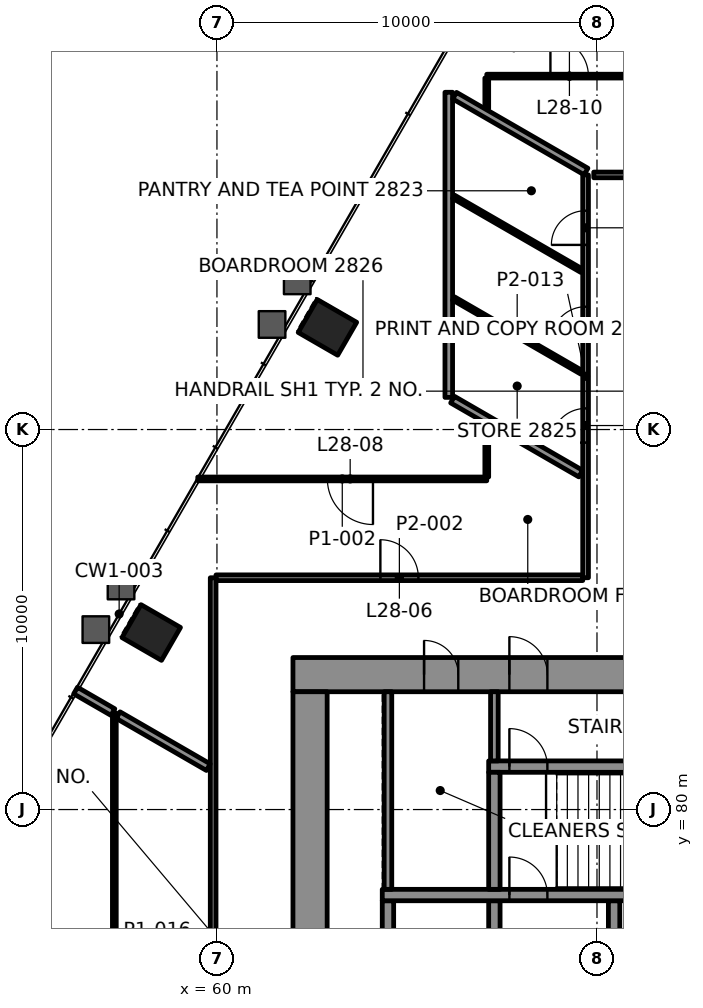
"""IFC4 building model, lengths in metres.
Left out: names, types, materials, properties, quantities, classifications, styles, units other than length and angle.
Written with IfcOpenShell. Run it as: python <this file> out.ifc"""

import sys

from ifc_helpers import new_model, si_unit, direction, frame, frame_2d, origin, origin_2d, place, context, subcontext, project, spatial, rectangle, extrude, element, fill, save


model = new_model("IFC4")
c1 = context("Model", 3, precision=1e-05, world=origin(), true_north=direction((0.0, 1.0)))
c2 = subcontext(c1, "Body", "Model", "MODEL_VIEW")
j1 = project(units=[si_unit("LENGTHUNIT", "METRE"), si_unit("PLANEANGLEUNIT", "RADIAN")], contexts=[c1])
p1 = place(None, origin())
s1 = spatial("IfcSite", under=j1, at=p1, CompositionType="ELEMENT")
p2 = place(p1, origin())
s2 = spatial("IfcBuilding", under=s1, at=p2, CompositionType="ELEMENT")
p3 = place(p2, frame((0.0, 0.0, 124.0)))
s3 = spatial("IfcBuildingStorey", under=s2, at=p3, CompositionType="ELEMENT", Elevation=124.0)
for number, where, z_axis, x_axis in (
    (1, (62.907, 92.688, -0.0), (0.0, 0.0, 1.0), (-0.5, -0.866, 0.0)),
    (2, (58.271, 84.658, -0.0), (0.0, 0.0, 1.0), (-0.5, -0.866, 0.0)),
):
    element("IfcColumn", number, at=place(p3, frame(where, z_axis=z_axis, x_axis=x_axis)), inside=s3, PredefinedType="COLUMN", context=c2, shape_type="SweptSolid", body=[
        extrude(rectangle(XDim=1.0, YDim=1.2, at=origin_2d()), origin(), (0.0, 0.0, 1.0), 4.2),
    ])
p4 = place(p3, frame((62.0, 83.55, 0.0), z_axis=(0.0, 0.0, 1.0), x_axis=(1.0, 0.0, 0.0)))
e3 = element("IfcWall", 3, at=p4, inside=s3, PredefinedType="SHEAR", context=c2, shape_type="SweptSolid", body=[
    extrude(rectangle(XDim=26.0, YDim=0.9, at=frame_2d((13.0, 0.0))), origin(), (0.0, 0.0, 1.0), 4.0),
])
p5 = place(p4, frame((5.695, 0.0, 0.0)))
e4 = element("IfcOpeningElement", 4, at=p5, cuts=e3, PredefinedType="OPENING", context=c2, shape_type="SweptSolid", body=[
    extrude(rectangle(XDim=1.0, YDim=2.1, at=frame_2d((0.5, 1.05))), frame((0.0, 0.46, 0.0), z_axis=(0.0, -1.0, 0.0), x_axis=(1.0, 0.0, 0.0)), (0.0, 0.0, 1.0), 0.92),
])
p6 = place(p4, frame((19.505, 0.0, 0.0)))
e5 = element("IfcOpeningElement", 5, at=p6, cuts=e3, PredefinedType="OPENING", context=c2, shape_type="SweptSolid", body=[
    extrude(rectangle(XDim=1.0, YDim=2.1, at=frame_2d((0.5, 1.05))), frame((0.0, 0.46, 0.0), z_axis=(0.0, -1.0, 0.0), x_axis=(1.0, 0.0, 0.0)), (0.0, 0.0, 1.0), 0.92),
])
p7 = place(p4, frame((3.45, 0.0, 0.0)))
e6 = element("IfcOpeningElement", 6, at=p7, cuts=e3, PredefinedType="OPENING", context=c2, shape_type="SweptSolid", body=[
    extrude(rectangle(XDim=0.9, YDim=2.1, at=frame_2d((0.45, 1.05))), frame((0.0, 0.46, 0.0), z_axis=(0.0, -1.0, 0.0), x_axis=(1.0, 0.0, 0.0)), (0.0, 0.0, 1.0), 0.92),
])
p8 = place(p4, frame((12.65, 0.0, 0.0)))
e7 = element("IfcOpeningElement", 7, at=p8, cuts=e3, PredefinedType="OPENING", context=c2, shape_type="SweptSolid", body=[
    extrude(rectangle(XDim=0.9, YDim=2.1, at=frame_2d((0.45, 1.05))), frame((0.0, 0.46, 0.0), z_axis=(0.0, -1.0, 0.0), x_axis=(1.0, 0.0, 0.0)), (0.0, 0.0, 1.0), 0.92),
])
p9 = place(p4, frame((22.55, 0.0, 0.0)))
e8 = element("IfcOpeningElement", 8, at=p9, cuts=e3, PredefinedType="OPENING", context=c2, shape_type="SweptSolid", body=[
    extrude(rectangle(XDim=0.9, YDim=2.1, at=frame_2d((0.45, 1.05))), frame((0.0, 0.46, 0.0), z_axis=(0.0, -1.0, 0.0), x_axis=(1.0, 0.0, 0.0)), (0.0, 0.0, 1.0), 0.92),
])
p10 = place(p3, frame((62.45, 66.9, 0.0), z_axis=(0.0, 0.0, 1.0), x_axis=(0.0, 1.0, 0.0)))
e9 = element("IfcWall", 9, at=p10, inside=s3, PredefinedType="SHEAR", context=c2, shape_type="SweptSolid", body=[
    extrude(rectangle(XDim=16.2, YDim=0.9, at=frame_2d((8.1, 0.0))), origin(), (0.0, 0.0, 1.0), 4.0),
])
p11 = place(p10, frame((5.5, 0.0, 0.0)))
e10 = element("IfcOpeningElement", 10, at=p11, cuts=e9, PredefinedType="OPENING", context=c2, shape_type="SweptSolid", body=[
    extrude(rectangle(XDim=1.8, YDim=2.1, at=frame_2d((0.9, 1.05))), frame((0.0, 0.46, 0.0), z_axis=(0.0, -1.0, 0.0), x_axis=(1.0, 0.0, 0.0)), (0.0, 0.0, 1.0), 0.92),
])
for number, where, z_axis, x_axis in (
    (11, (64.5, 75.0, 0.0), (0.0, 0.0, 1.0), (0.0, 1.0, 0.0)),
    (12, (67.3, 75.0, 0.0), (0.0, 0.0, 1.0), (0.0, 1.0, 0.0)),
):
    element("IfcWall", number, at=place(p3, frame(where, z_axis=z_axis, x_axis=x_axis)), inside=s3, PredefinedType="SHEAR", context=c2, shape_type="SweptSolid", body=[
        extrude(rectangle(XDim=2.6, YDim=0.3, at=frame_2d((1.3, 0.0))), origin(), (0.0, 0.0, 1.0), 4.0),
    ])
p12 = place(p3, frame((70.45, 75.0, 0.0), z_axis=(0.0, 0.0, 1.0), x_axis=(0.0, 1.0, 0.0)))
e13 = element("IfcWall", 13, at=p12, inside=s3, PredefinedType="SHEAR", context=c2, shape_type="SweptSolid", body=[
    extrude(rectangle(XDim=2.6, YDim=0.3, at=frame_2d((1.3, 0.0))), origin(), (0.0, 0.0, 1.0), 4.0),
])
p13 = place(p12, frame((0.15, 0.0, 0.0)))
e14 = element("IfcOpeningElement", 14, at=p13, cuts=e13, PredefinedType="OPENING", context=c2, shape_type="SweptSolid", body=[
    extrude(rectangle(XDim=1.1, YDim=2.1, at=frame_2d((0.55, 1.05))), frame((0.0, 0.16, 0.0), z_axis=(0.0, -1.0, 0.0), x_axis=(1.0, 0.0, 0.0)), (0.0, 0.0, 1.0), 0.32),
])
p14 = place(p3, frame((64.35, 77.75, 0.0), z_axis=(0.0, 0.0, 1.0), x_axis=(1.0, 0.0, 0.0)))
e15 = element("IfcWall", 15, at=p14, inside=s3, PredefinedType="SHEAR", context=c2, shape_type="SweptSolid", body=[
    extrude(rectangle(XDim=22.75, YDim=0.3, at=frame_2d((11.375, 0.0))), origin(), (0.0, 0.0, 1.0), 4.0),
])
p15 = place(p14, frame((3.345, 0.0, 0.0)))
e16 = element("IfcOpeningElement", 16, at=p15, cuts=e15, PredefinedType="OPENING", context=c2, shape_type="SweptSolid", body=[
    extrude(rectangle(XDim=1.0, YDim=2.1, at=frame_2d((0.5, 1.05))), frame((0.0, 0.16, 0.0), z_axis=(0.0, -1.0, 0.0), x_axis=(1.0, 0.0, 0.0)), (0.0, 0.0, 1.0), 0.32),
])
p16 = place(p3, frame((67.15, 81.13, 0.0), z_axis=(0.0, 0.0, 1.0), x_axis=(1.0, 0.0, 0.0)))
e17 = element("IfcWall", 17, at=p16, inside=s3, PredefinedType="SHEAR", context=c2, shape_type="SweptSolid", body=[
    extrude(rectangle(XDim=6.91, YDim=0.3, at=frame_2d((3.455, 0.0))), origin(), (0.0, 0.0, 1.0), 4.0),
])
p17 = place(p16, frame((0.545, 0.0, 0.0)))
e18 = element("IfcOpeningElement", 18, at=p17, cuts=e17, PredefinedType="OPENING", context=c2, shape_type="SweptSolid", body=[
    extrude(rectangle(XDim=1.0, YDim=2.1, at=frame_2d((0.5, 1.05))), frame((0.0, 0.16, 0.0), z_axis=(0.0, -1.0, 0.0), x_axis=(1.0, 0.0, 0.0)), (0.0, 0.0, 1.0), 0.32),
])
p18 = place(p3, frame((67.3, 77.9, 0.0), z_axis=(0.0, 0.0, 1.0), x_axis=(0.0, 1.0, 0.0)))
e19 = element("IfcWall", 19, at=p18, inside=s3, PredefinedType="SHEAR", context=c2, shape_type="SweptSolid", body=[
    extrude(rectangle(XDim=3.08, YDim=0.3, at=frame_2d((1.54, 0.0))), origin(), (0.0, 0.0, 1.0), 4.0),
])
p19 = place(p3, frame((59.976, 86.1, 0.0), z_axis=(0.0, 0.0, 1.0), x_axis=(1.0, 0.0, 0.0)))
e20 = element("IfcWall", 20, at=p19, inside=s3, PredefinedType="PARTITIONING", context=c2, shape_type="SweptSolid", body=[
    extrude(rectangle(XDim=9.649, YDim=0.15, at=frame_2d((4.825, 0.0))), origin(), (0.0, 0.0, 1.0), 3.4),
])
p20 = place(p19, frame((4.325, 0.0, 0.0)))
e21 = element("IfcOpeningElement", 21, at=p20, cuts=e20, PredefinedType="OPENING", context=c2, shape_type="SweptSolid", body=[
    extrude(rectangle(XDim=1.0, YDim=2.1, at=frame_2d((0.5, 1.05))), frame((0.0, 0.085, 0.0), z_axis=(0.0, -1.0, 0.0), x_axis=(1.0, 0.0, 0.0)), (0.0, 0.0, 1.0), 0.17),
])
p21 = place(p3, frame((67.1, 88.7, 0.0), z_axis=(0.0, 0.0, 1.0), x_axis=(-1.0, 0.0, 0.0)))
e22 = element("IfcWall", 22, at=p21, inside=s3, PredefinedType="PARTITIONING", context=c2, shape_type="SweptSolid", body=[
    extrude(rectangle(XDim=7.604, YDim=0.1, at=frame_2d((3.802, 0.0))), origin(), (0.0, 0.0, 1.0), 3.165),
])
p22 = place(p21, frame((2.994, 0.0, 0.0)))
e23 = element("IfcOpeningElement", 23, at=p22, cuts=e22, PredefinedType="OPENING", context=c2, shape_type="SweptSolid", body=[
    extrude(rectangle(XDim=1.2, YDim=2.1, at=frame_2d((0.6, 1.05))), frame((0.0, 0.06, 0.0), z_axis=(0.0, -1.0, 0.0), x_axis=(1.0, 0.0, 0.0)), (0.0, 0.0, 1.0), 0.12),
])
p23 = place(p3, frame((69.915, 96.7, 0.0), z_axis=(0.0, 0.0, 1.0), x_axis=(1.0, 0.0, 0.0)))
e24 = element("IfcWall", 24, at=p23, inside=s3, PredefinedType="PARTITIONING", context=c2, shape_type="SweptSolid", body=[
    extrude(rectangle(XDim=4.11, YDim=0.15, at=frame_2d((2.055, 0.0))), origin(), (0.0, 0.0, 1.0), 3.4),
])
p24 = place(p23, frame((1.555, 0.0, 0.0)))
e25 = element("IfcOpeningElement", 25, at=p24, cuts=e24, PredefinedType="OPENING", context=c2, shape_type="SweptSolid", body=[
    extrude(rectangle(XDim=1.0, YDim=2.1, at=frame_2d((0.5, 1.05))), frame((0.0, 0.085, 0.0), z_axis=(0.0, -1.0, 0.0), x_axis=(1.0, 0.0, 0.0)), (0.0, 0.0, 1.0), 0.17),
])
p25 = place(p3, frame((67.1, 99.3, 0.0), z_axis=(0.0, 0.0, 1.0), x_axis=(1.0, 0.0, 0.0)))
e26 = element("IfcWall", 26, at=p25, inside=s3, PredefinedType="PARTITIONING", context=c2, shape_type="SweptSolid", body=[
    extrude(rectangle(XDim=4.349, YDim=0.1, at=frame_2d((2.175, 0.0))), origin(), (0.0, 0.0, 1.0), 3.4),
])
p26 = place(p25, frame((1.675, 0.0, 0.0)))
e27 = element("IfcOpeningElement", 27, at=p26, cuts=e26, PredefinedType="OPENING", context=c2, shape_type="SweptSolid", body=[
    extrude(rectangle(XDim=1.0, YDim=2.1, at=frame_2d((0.5, 1.05))), frame((0.0, 0.06, 0.0), z_axis=(0.0, -1.0, 0.0), x_axis=(1.0, 0.0, 0.0)), (0.0, 0.0, 1.0), 0.12),
])
p27 = place(p3, frame((69.7, 86.1, 0.0), z_axis=(0.0, 0.0, 1.0), x_axis=(0.0, 1.0, 0.0)))
e28 = element("IfcWall", 28, at=p27, inside=s3, PredefinedType="PARTITIONING", context=c2, shape_type="SweptSolid", body=[
    extrude(rectangle(XDim=10.6, YDim=0.15, at=frame_2d((5.3, 0.0))), origin(), (0.0, 0.0, 1.0), 3.322),
])
p28 = place(p27, frame((3.555, 0.0, 0.0)))
e29 = element("IfcOpeningElement", 29, at=p28, cuts=e28, PredefinedType="OPENING", context=c2, shape_type="SweptSolid", body=[
    extrude(rectangle(XDim=0.9, YDim=2.1, at=frame_2d((0.45, 1.05))), frame((0.0, 0.085, 0.0), z_axis=(0.0, -1.0, 0.0), x_axis=(1.0, 0.0, 0.0)), (0.0, 0.0, 1.0), 0.17),
])
p29 = place(p27, frame((6.232, 0.0, 0.0)))
e30 = element("IfcOpeningElement", 30, at=p29, cuts=e28, PredefinedType="OPENING", context=c2, shape_type="SweptSolid", body=[
    extrude(rectangle(XDim=0.9, YDim=2.1, at=frame_2d((0.45, 1.05))), frame((0.0, 0.085, 0.0), z_axis=(0.0, -1.0, 0.0), x_axis=(1.0, 0.0, 0.0)), (0.0, 0.0, 1.0), 0.17),
])
p30 = place(p27, frame((8.759, 0.0, 0.0)))
e31 = element("IfcOpeningElement", 31, at=p30, cuts=e28, PredefinedType="OPENING", context=c2, shape_type="SweptSolid", body=[
    extrude(rectangle(XDim=0.9, YDim=2.1, at=frame_2d((0.45, 1.05))), frame((0.0, 0.085, 0.0), z_axis=(0.0, -1.0, 0.0), x_axis=(1.0, 0.0, 0.0)), (0.0, 0.0, 1.0), 0.17),
])
p31 = place(p3, frame((67.1, 88.75, 0.0), z_axis=(0.0, 0.0, 1.0), x_axis=(0.0, 1.0, 0.0)))
e32 = element("IfcWall", 32, at=p31, inside=s3, PredefinedType="PARTITIONING", context=c2, shape_type="SweptSolid", body=[
    extrude(rectangle(XDim=1.372, YDim=0.1, at=frame_2d((0.686, 0.0))), origin(), (0.0, 0.0, 1.0), 3.322),
])
p32 = place(p3, frame((67.1, 98.443, 0.0), z_axis=(0.0, 0.0, 1.0), x_axis=(0.0, 1.0, 0.0)))
e33 = element("IfcWall", 33, at=p32, inside=s3, PredefinedType="PARTITIONING", context=c2, shape_type="SweptSolid", body=[
    extrude(rectangle(XDim=0.807, YDim=0.1, at=frame_2d((0.403, 0.0))), origin(), (0.0, 0.0, 1.0), 3.4),
])
p33 = place(p3, frame((66.1, 90.846, 0.0), z_axis=(0.0, 0.0, 1.0), x_axis=(0.0, 1.0, 0.0)))
e34 = element("IfcWall", 34, at=p33, inside=s3, PredefinedType="PARTITIONING", context=c2, shape_type="SweptSolid", body=[
    extrude(rectangle(XDim=8.029, YDim=0.2, at=frame_2d((4.014, 0.0))), origin(), (0.0, 0.0, 1.0), 3.165),
])
p34 = place(p3, frame((59.9, 67.321, 0.0), z_axis=(0.0, 0.0, 1.0), x_axis=(0.0, 1.0, 0.0)))
e35 = element("IfcWall", 35, at=p34, inside=s3, PredefinedType="PARTITIONING", context=c2, shape_type="SweptSolid", body=[
    extrude(rectangle(XDim=18.778, YDim=0.15, at=frame_2d((9.389, 0.0))), origin(), (0.0, 0.0, 1.0), 3.4),
])
p35 = place(p3, frame((57.3, 82.542, 0.0), z_axis=(0.0, 0.0, 1.0), x_axis=(0.0, -1.0, 0.0)))
e36 = element("IfcWall", 36, at=p35, inside=s3, PredefinedType="PARTITIONING", context=c2, shape_type="SweptSolid", body=[
    extrude(rectangle(XDim=13.72, YDim=0.1, at=frame_2d((6.86, 0.0))), origin(), (0.0, 0.0, 1.0), 3.4),
])
p36 = place(p35, frame((6.36, 0.0, 0.0)))
e37 = element("IfcOpeningElement", 37, at=p36, cuts=e36, PredefinedType="OPENING", context=c2, shape_type="SweptSolid", body=[
    extrude(rectangle(XDim=1.0, YDim=2.1, at=frame_2d((0.5, 1.05))), frame((0.0, 0.06, 0.0), z_axis=(0.0, -1.0, 0.0), x_axis=(1.0, 0.0, 0.0)), (0.0, 0.0, 1.0), 0.12),
])
p37 = place(p3, frame((69.711, 96.79, 0.0), z_axis=(0.0, 0.0, 1.0), x_axis=(-0.866021621257, 0.500006551472, 0.0)))
e38 = element("IfcWall", 38, at=p37, inside=s3, PredefinedType="PARTITIONING", context=c2, shape_type="SweptSolid", body=[
    extrude(rectangle(XDim=3.992, YDim=0.2, at=frame_2d((1.996, 0.0))), origin(), (0.0, 0.0, 1.0), 3.165),
])
p38 = place(p3, frame((69.599, 94.178, 0.0), z_axis=(0.0, 0.0, 1.0), x_axis=(-0.866016482536, 0.500015451737, 0.0)))
e39 = element("IfcWall", 39, at=p38, inside=s3, PredefinedType="PARTITIONING", context=c2, shape_type="SweptSolid", body=[
    extrude(rectangle(XDim=3.895, YDim=0.1, at=frame_2d((1.948, 0.0))), origin(), (0.0, 0.0, 1.0), 3.4),
])
p39 = place(p3, frame((69.599, 91.501, 0.0), z_axis=(0.0, 0.0, 1.0), x_axis=(-0.866043624834, 0.499968438888, 0.0)))
e40 = element("IfcWall", 40, at=p39, inside=s3, PredefinedType="PARTITIONING", context=c2, shape_type="SweptSolid", body=[
    extrude(rectangle(XDim=3.895, YDim=0.1, at=frame_2d((1.947, 0.0))), origin(), (0.0, 0.0, 1.0), 3.4),
])
p40 = place(p3, frame((69.573, 88.84, 0.0), z_axis=(0.0, 0.0, 1.0), x_axis=(-0.866043624834, 0.499968438888, 0.0)))
e41 = element("IfcWall", 41, at=p40, inside=s3, PredefinedType="PARTITIONING", context=c2, shape_type="SweptSolid", body=[
    extrude(rectangle(XDim=3.895, YDim=0.2, at=frame_2d((1.947, 0.0))), origin(), (0.0, 0.0, 1.0), 3.322),
])
p41 = place(p3, frame((59.773, 81.115, 0.0), z_axis=(0.0, 0.0, 1.0), x_axis=(-0.86604168154, 0.499971805041, 0.0)))
e42 = element("IfcWall", 42, at=p41, inside=s3, PredefinedType="PARTITIONING", context=c2, shape_type="SweptSolid", body=[
    extrude(rectangle(XDim=2.74, YDim=0.2, at=frame_2d((1.37, 0.0))), origin(), (0.0, 0.0, 1.0), 3.4),
])
p42 = place(p3, frame((57.263, 82.564, 0.0), z_axis=(0.0, 0.0, 1.0), x_axis=(-0.8660349869, 0.499983401189, 0.0)))
e43 = element("IfcWall", 43, at=p42, inside=s3, PredefinedType="PARTITIONING", context=c2, shape_type="SweptSolid", body=[
    extrude(rectangle(XDim=1.134, YDim=0.2, at=frame_2d((0.567, 0.0))), origin(), (0.0, 0.0, 1.0), 3.165),
])
p43 = place(p3, frame((64.5, 77.9, 0.0), z_axis=(0.0, 0.0, 1.0), x_axis=(0.0, 1.0, 0.0)))
e44 = element("IfcWall", 44, at=p43, inside=s3, PredefinedType="PARTITIONING", context=c2, shape_type="SweptSolid", body=[
    extrude(rectangle(XDim=5.2, YDim=0.2, at=frame_2d((2.6, 0.0))), origin(), (0.0, 0.0, 1.0), 4.0),
])
p44 = place(p3, frame((67.3, 81.28, 0.0), z_axis=(0.0, 0.0, 1.0), x_axis=(0.0, 1.0, 0.0)))
e45 = element("IfcWall", 45, at=p44, inside=s3, PredefinedType="PARTITIONING", context=c2, shape_type="SweptSolid", body=[
    extrude(rectangle(XDim=1.82, YDim=0.2, at=frame_2d((0.91, 0.0))), origin(), (0.0, 0.0, 1.0), 4.0),
])
p45 = place(p20, origin())
e46 = element("IfcDoor", 46, at=p45, inside=s3, OperationType="SINGLE_SWING_RIGHT", PredefinedType="DOOR", context=c2, shape_type="SweptSolid", body=[
    extrude(rectangle(XDim=1.0, YDim=2.1, at=frame_2d((0.5, 1.05))), frame((0.0, 0.025, 0.0), z_axis=(0.0, -1.0, 0.0), x_axis=(1.0, 0.0, 0.0)), (0.0, 0.0, 1.0), 0.05),
])
fill(e21, e46)
p46 = place(p22, origin())
e47 = element("IfcDoor", 47, at=p46, inside=s3, OperationType="DOUBLE_DOOR_SINGLE_SWING", PredefinedType="DOOR", context=c2, shape_type="SweptSolid", body=[
    extrude(rectangle(XDim=1.2, YDim=2.1, at=frame_2d((0.6, 1.05))), frame((0.0, 0.025, 0.0), z_axis=(0.0, -1.0, 0.0), x_axis=(1.0, 0.0, 0.0)), (0.0, 0.0, 1.0), 0.05),
])
fill(e23, e47)
p47 = place(p26, origin())
e48 = element("IfcDoor", 48, at=p47, inside=s3, OperationType="SINGLE_SWING_RIGHT", PredefinedType="DOOR", context=c2, shape_type="SweptSolid", body=[
    extrude(rectangle(XDim=1.0, YDim=2.1, at=frame_2d((0.5, 1.05))), frame((0.0, 0.025, 0.0), z_axis=(0.0, -1.0, 0.0), x_axis=(1.0, 0.0, 0.0)), (0.0, 0.0, 1.0), 0.05),
])
fill(e27, e48)
p48 = place(p28, origin())
e49 = element("IfcDoor", 49, at=p48, inside=s3, OperationType="SINGLE_SWING_RIGHT", PredefinedType="DOOR", context=c2, shape_type="SweptSolid", body=[
    extrude(rectangle(XDim=0.9, YDim=2.1, at=frame_2d((0.45, 1.05))), frame((0.0, 0.025, 0.0), z_axis=(0.0, -1.0, 0.0), x_axis=(1.0, 0.0, 0.0)), (0.0, 0.0, 1.0), 0.05),
])
fill(e29, e49)
p49 = place(p29, origin())
e50 = element("IfcDoor", 50, at=p49, inside=s3, OperationType="SINGLE_SWING_LEFT", PredefinedType="DOOR", context=c2, shape_type="SweptSolid", body=[
    extrude(rectangle(XDim=0.9, YDim=2.1, at=frame_2d((0.45, 1.05))), frame((0.0, 0.025, 0.0), z_axis=(0.0, -1.0, 0.0), x_axis=(1.0, 0.0, 0.0)), (0.0, 0.0, 1.0), 0.05),
])
fill(e30, e50)
p50 = place(p30, origin())
e51 = element("IfcDoor", 51, at=p50, inside=s3, OperationType="SINGLE_SWING_RIGHT", PredefinedType="DOOR", context=c2, shape_type="SweptSolid", body=[
    extrude(rectangle(XDim=0.9, YDim=2.1, at=frame_2d((0.45, 1.05))), frame((0.0, 0.025, 0.0), z_axis=(0.0, -1.0, 0.0), x_axis=(1.0, 0.0, 0.0)), (0.0, 0.0, 1.0), 0.05),
])
fill(e31, e51)
p51 = place(p15, origin())
e52 = element("IfcDoor", 52, at=p51, inside=s3, OperationType="SINGLE_SWING_LEFT", PredefinedType="DOOR", context=c2, shape_type="SweptSolid", body=[
    extrude(rectangle(XDim=1.0, YDim=2.1, at=frame_2d((0.5, 1.05))), frame((0.0, 0.025, 0.0), z_axis=(0.0, -1.0, 0.0), x_axis=(1.0, 0.0, 0.0)), (0.0, 0.0, 1.0), 0.05),
])
fill(e16, e52)
p52 = place(p17, origin())
e53 = element("IfcDoor", 53, at=p52, inside=s3, OperationType="SINGLE_SWING_RIGHT", PredefinedType="DOOR", context=c2, shape_type="SweptSolid", body=[
    extrude(rectangle(XDim=1.0, YDim=2.1, at=frame_2d((0.5, 1.05))), frame((0.0, 0.025, 0.0), z_axis=(0.0, -1.0, 0.0), x_axis=(1.0, 0.0, 0.0)), (0.0, 0.0, 1.0), 0.05),
])
fill(e18, e53)
p53 = place(p5, origin())
e54 = element("IfcDoor", 54, at=p53, inside=s3, OperationType="SINGLE_SWING_LEFT", PredefinedType="DOOR", context=c2, shape_type="SweptSolid", body=[
    extrude(rectangle(XDim=1.0, YDim=2.1, at=frame_2d((0.5, 1.05))), frame((0.0, 0.17, 0.0), z_axis=(0.0, -1.0, 0.0), x_axis=(1.0, 0.0, 0.0)), (0.0, 0.0, 1.0), 0.34),
])
fill(e4, e54)
p54 = place(p7, origin())
e55 = element("IfcDoor", 55, at=p54, inside=s3, OperationType="SINGLE_SWING_RIGHT", PredefinedType="DOOR", context=c2, shape_type="SweptSolid", body=[
    extrude(rectangle(XDim=0.9, YDim=2.1, at=frame_2d((0.45, 1.05))), frame((0.0, 0.17, 0.0), z_axis=(0.0, -1.0, 0.0), x_axis=(1.0, 0.0, 0.0)), (0.0, 0.0, 1.0), 0.34),
])
fill(e6, e55)
save(model, sys.argv[1])
